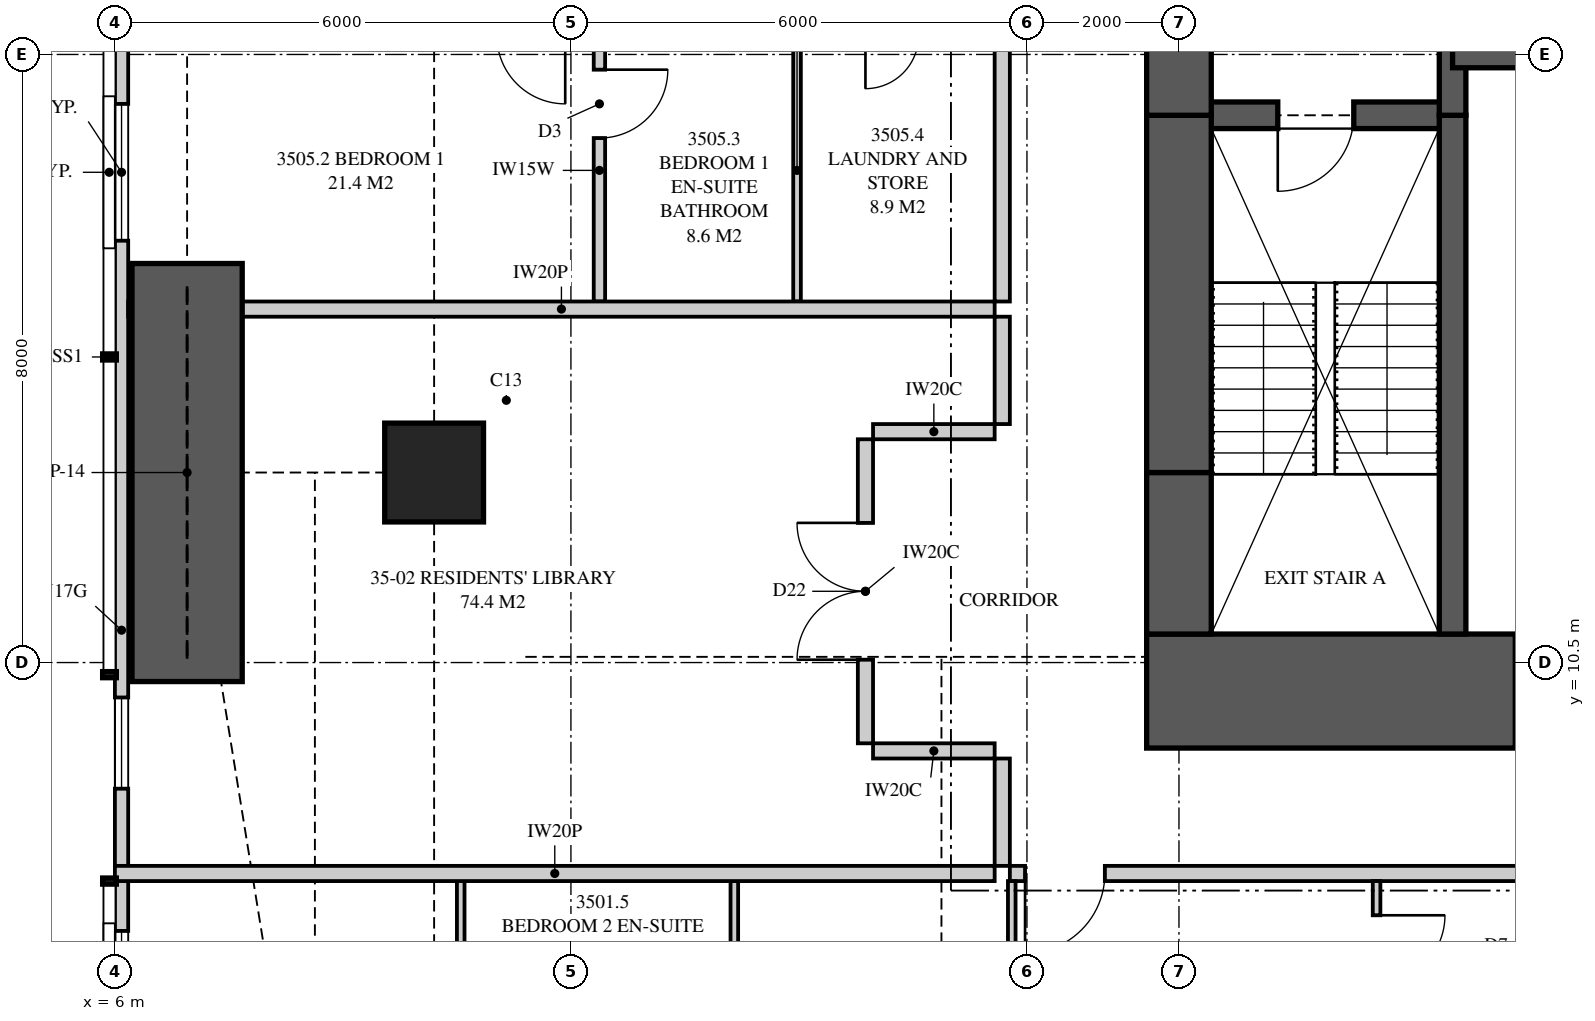
"""IFC4 building model, lengths in metres.
Left out: names, types, materials, properties, quantities, classifications, styles, units other than length and angle.
Written with IfcOpenShell. Run it as: python <this file> out.ifc"""

import sys

from ifc_helpers import new_model, si_unit, direction, frame, frame_2d, origin, origin_2d, place, context, subcontext, project, spatial, polyline, rectangle, outline, extrude, element, fill, save


model = new_model("IFC4")
c1 = context("Model", 3, precision=1e-05, world=origin(), true_north=direction((0.0, 1.0)))
c2 = subcontext(c1, "Body", "Model", "MODEL_VIEW")
j1 = project(units=[si_unit("LENGTHUNIT", "METRE"), si_unit("PLANEANGLEUNIT", "RADIAN")], contexts=[c1])
p1 = place(None, origin())
s1 = spatial("IfcSite", under=j1, at=p1, CompositionType="ELEMENT")
p2 = place(p1, origin())
s2 = spatial("IfcBuilding", under=s1, at=p2, CompositionType="ELEMENT")
p3 = place(p2, frame((0.0, 0.0, 128.3)))
s3 = spatial("IfcBuildingStorey", under=s2, at=p3, CompositionType="ELEMENT", Elevation=128.3)
p4 = place(p3, frame((10.2, 13.0, 0.0), z_axis=(0.0, 0.0, 1.0), x_axis=(1.0, 0.0, 0.0)))
e1 = element("IfcColumn", 1, at=p4, inside=s3, PredefinedType="COLUMN", context=c2, shape_type="SweptSolid", body=[
    extrude(rectangle(XDim=1.3, YDim=1.3, at=origin_2d()), origin(), (0.0, 0.0, 1.0), 3.35),
])
p5 = place(p3, frame((19.575, 10.125, 0.0), z_axis=(0.0, 0.0, 1.0), x_axis=(1.0, 0.0, 0.0)))
e2 = element("IfcWall", 2, at=p5, inside=s3, PredefinedType="SHEAR", context=c2, shape_type="SweptSolid", body=[
    extrude(rectangle(XDim=6.425, YDim=1.5, at=frame_2d((3.212, 0.0))), origin(), (0.0, 0.0, 1.0), 3.35),
])
p6 = place(p5, frame((4.85, 0.0, 0.0)))
e3 = element("IfcOpeningElement", 3, at=p6, cuts=e2, PredefinedType="OPENING", context=c2, shape_type="SweptSolid", body=[
    extrude(rectangle(XDim=0.75, YDim=2.1, at=frame_2d((0.375, 1.05))), frame((0.0, 0.76, 0.0), z_axis=(0.0, -1.0, 0.0), x_axis=(1.0, 0.0, 0.0)), (0.0, 0.0, 1.0), 1.52),
])
p7 = place(p3, frame((20.0, 23.3, 0.0), z_axis=(0.0, 0.0, 1.0), x_axis=(0.0, -1.0, 0.0)))
e4 = element("IfcWall", 4, at=p7, inside=s3, PredefinedType="SHEAR", context=c2, shape_type="SweptSolid", body=[
    extrude(rectangle(XDim=5.6, YDim=0.85, at=frame_2d((2.8, 0.0))), origin(), (0.0, 0.0, 1.0), 3.35),
])
p8 = place(p7, frame((3.4, 0.0, 0.0)))
e5 = element("IfcOpeningElement", 5, at=p8, cuts=e4, PredefinedType="OPENING", context=c2, shape_type="SweptSolid", body=[
    extrude(rectangle(XDim=1.2, YDim=2.2, at=frame_2d((0.6, 1.1))), frame((0.0, 0.435, 0.0), z_axis=(0.0, -1.0, 0.0), x_axis=(1.0, 0.0, 0.0)), (0.0, 0.0, 1.0), 0.87),
])
p9 = place(p3, frame((20.0, 17.7, 0.0), z_axis=(0.0, 0.0, 1.0), x_axis=(0.0, -1.0, 0.0)))
e6 = element("IfcWall", 6, at=p9, inside=s3, PredefinedType="SHEAR", context=c2, shape_type="SweptSolid", body=[
    extrude(rectangle(XDim=4.7, YDim=0.85, at=frame_2d((2.35, 0.0))), origin(), (0.0, 0.0, 1.0), 3.35),
])
p10 = place(p3, frame((20.0, 13.0, 0.0), z_axis=(0.0, 0.0, 1.0), x_axis=(0.0, -1.0, 0.0)))
e7 = element("IfcWall", 7, at=p10, inside=s3, PredefinedType="SHEAR", context=c2, shape_type="SweptSolid", body=[
    extrude(rectangle(XDim=2.125, YDim=0.85, at=frame_2d((1.062, 0.0))), origin(), (0.0, 0.0, 1.0), 3.35),
])
p11 = place(p3, frame((23.6, 10.875, 0.0), z_axis=(0.0, 0.0, 1.0), x_axis=(0.0, 1.0, 0.0)))
e8 = element("IfcWall", 8, at=p11, inside=s3, PredefinedType="SHEAR", context=c2, shape_type="SweptSolid", body=[
    extrude(rectangle(XDim=6.825, YDim=0.35, at=frame_2d((3.413, 0.0))), origin(), (0.0, 0.0, 1.0), 3.35),
])
p12 = place(p3, frame((23.6, 17.7, 0.0), z_axis=(0.0, 0.0, 1.0), x_axis=(0.0, 1.0, 0.0)))
e9 = element("IfcWall", 9, at=p12, inside=s3, PredefinedType="SHEAR", context=c2, shape_type="SweptSolid", body=[
    extrude(rectangle(XDim=5.6, YDim=0.35, at=frame_2d((2.8, 0.0))), origin(), (0.0, 0.0, 1.0), 3.35),
])
p13 = place(p3, frame((20.0, 17.7, 0.0), z_axis=(0.0, 0.0, 1.0), x_axis=(1.0, 0.0, 0.0)))
e10 = element("IfcWall", 10, at=p13, inside=s3, PredefinedType="SHEAR", context=c2, shape_type="SweptSolid", body=[
    extrude(rectangle(XDim=3.6, YDim=0.35, at=frame_2d((1.8, 0.0))), origin(), (0.0, 0.0, 1.0), 3.35),
])
p14 = place(p13, frame((1.3, 0.0, 0.0)))
e11 = element("IfcOpeningElement", 11, at=p14, cuts=e10, PredefinedType="OPENING", context=c2, shape_type="SweptSolid", body=[
    extrude(rectangle(XDim=1.0, YDim=2.1, at=frame_2d((0.5, 1.05))), frame((0.0, 0.185, 0.0), z_axis=(0.0, -1.0, 0.0), x_axis=(1.0, 0.0, 0.0)), (0.0, 0.0, 1.0), 0.37),
])
p15 = place(p3, frame((23.6, 18.5, 0.0), z_axis=(0.0, 0.0, 1.0), x_axis=(1.0, 0.0, 0.0)))
e12 = element("IfcWall", 12, at=p15, inside=s3, PredefinedType="SHEAR", context=c2, shape_type="SweptSolid", body=[
    extrude(rectangle(XDim=2.4, YDim=0.35, at=frame_2d((1.2, 0.0))), origin(), (0.0, 0.0, 1.0), 3.35),
])
p16 = place(p3, frame((6.087, 18.8, 0.0), z_axis=(0.0, 0.0, 1.0), x_axis=(0.0, -1.0, 0.0)))
e13 = element("IfcWall", 13, at=p16, inside=s3, PredefinedType="SOLIDWALL", context=c2, shape_type="SweptSolid", body=[
    extrude(outline(polyline([(0.0, 0.0), (15.749, 0.0), (15.749, 3.11), (6.019, 3.11), (6.019, 2.15), (5.926, 2.15), (5.926, 3.11), (5.8, 3.11), (5.8, 2.15), (0.0, 2.15), (0.0, 0.0)])), frame((0.0, 0.087, 0.0), z_axis=(0.0, -1.0, 0.0), x_axis=(1.0, 0.0, 0.0)), (0.0, 0.0, 1.0), 0.175),
])
p17 = place(p16, frame((0.95, 0.0, 0.4)))
e14 = element("IfcOpeningElement", 14, at=p17, cuts=e13, PredefinedType="OPENING", context=c2, shape_type="SweptSolid", body=[
    extrude(rectangle(XDim=1.8, YDim=1.7, at=frame_2d((0.9, 0.85))), frame((0.0, 0.097, 0.0), z_axis=(0.0, -1.0, 0.0), x_axis=(1.0, 0.0, 0.0)), (0.0, 0.0, 1.0), 0.195),
])
p18 = place(p16, frame((8.76, 0.0, 0.4)))
e15 = element("IfcOpeningElement", 15, at=p18, cuts=e13, PredefinedType="OPENING", context=c2, shape_type="SweptSolid", body=[
    extrude(rectangle(XDim=1.2, YDim=1.7, at=frame_2d((0.6, 0.85))), frame((0.0, 0.097, 0.0), z_axis=(0.0, -1.0, 0.0), x_axis=(1.0, 0.0, 0.0)), (0.0, 0.0, 1.0), 0.195),
])
p19 = place(p16, frame((11.831, 0.0, 0.4)))
e16 = element("IfcOpeningElement", 16, at=p19, cuts=e13, PredefinedType="OPENING", context=c2, shape_type="SweptSolid", body=[
    extrude(rectangle(XDim=1.8, YDim=1.7, at=frame_2d((0.9, 0.85))), frame((0.0, 0.097, 0.0), z_axis=(0.0, -1.0, 0.0), x_axis=(1.0, 0.0, 0.0)), (0.0, 0.0, 1.0), 0.195),
])
p20 = place(p3, frame((17.775, 7.725, 0.0), z_axis=(0.0, 0.0, 1.0), x_axis=(1.0, 0.0, 0.0)))
e17 = element("IfcWall", 17, at=p20, inside=s3, PredefinedType="PARTITIONING", context=c2, shape_type="SweptSolid", body=[
    extrude(rectangle(XDim=9.025, YDim=0.2, at=frame_2d((4.513, 0.0))), origin(), (0.0, 0.0, 1.0), 3.11),
])
p21 = place(p20, frame((0.2, 0.0, 0.0)))
e18 = element("IfcOpeningElement", 18, at=p21, cuts=e17, PredefinedType="OPENING", context=c2, shape_type="SweptSolid", body=[
    extrude(rectangle(XDim=1.05, YDim=2.2, at=frame_2d((0.525, 1.1))), frame((0.0, 0.11, 0.0), z_axis=(0.0, -1.0, 0.0), x_axis=(1.0, 0.0, 0.0)), (0.0, 0.0, 1.0), 0.22),
])
p22 = place(p3, frame((10.55, 2.76, 0.0), z_axis=(0.0, 0.0, 1.0), x_axis=(0.0, 1.0, 0.0)))
e19 = element("IfcWall", 19, at=p22, inside=s3, PredefinedType="PARTITIONING", context=c2, shape_type="SweptSolid", body=[
    extrude(outline(polyline([(0.0, 0.0), (4.865, 0.0), (4.865, 2.51), (0.358, 2.51), (0.358, 2.15), (0.0, 2.15), (0.0, 0.0)])), frame((0.0, 0.05, 0.0), z_axis=(0.0, -1.0, 0.0), x_axis=(1.0, 0.0, 0.0)), (0.0, 0.0, 1.0), 0.1),
])
p23 = place(p22, frame((2.834, 0.0, 0.0)))
e20 = element("IfcOpeningElement", 20, at=p23, cuts=e19, PredefinedType="OPENING", context=c2, shape_type="SweptSolid", body=[
    extrude(rectangle(XDim=0.9, YDim=2.1, at=frame_2d((0.45, 1.05))), frame((0.0, 0.06, 0.0), z_axis=(0.0, -1.0, 0.0), x_axis=(1.0, 0.0, 0.0)), (0.0, 0.0, 1.0), 0.12),
])
p24 = place(p3, frame((14.15, 0.175, 0.0), z_axis=(0.0, 0.0, 1.0), x_axis=(0.0, 1.0, 0.0)))
e21 = element("IfcWall", 21, at=p24, inside=s3, PredefinedType="PARTITIONING", context=c2, shape_type="SweptSolid", body=[
    extrude(outline(polyline([(0.0, 0.0), (7.45, 0.0), (7.45, 3.11), (2.208, 3.11), (2.208, 2.15), (0.453, 2.15), (0.453, 3.11), (0.0, 3.11), (0.0, 0.0)])), frame((0.0, 0.05, 0.0), z_axis=(0.0, -1.0, 0.0), x_axis=(1.0, 0.0, 0.0)), (0.0, 0.0, 1.0), 0.1),
])
p25 = place(p24, frame((3.6, 0.0, 0.0)))
e22 = element("IfcOpeningElement", 22, at=p25, cuts=e21, PredefinedType="OPENING", context=c2, shape_type="SweptSolid", body=[
    extrude(rectangle(XDim=0.9, YDim=2.1, at=frame_2d((0.45, 1.05))), frame((0.0, 0.06, 0.0), z_axis=(0.0, -1.0, 0.0), x_axis=(1.0, 0.0, 0.0)), (0.0, 0.0, 1.0), 0.12),
])
p26 = place(p3, frame((22.6, 0.175, 0.0), z_axis=(0.0, 0.0, 1.0), x_axis=(0.0, 1.0, 0.0)))
e23 = element("IfcWall", 23, at=p26, inside=s3, PredefinedType="PARTITIONING", context=c2, shape_type="SweptSolid", body=[
    extrude(outline(polyline([(0.0, 0.0), (7.45, 0.0), (7.45, 3.11), (1.635, 3.11), (1.635, 2.15), (0.0, 2.15), (0.0, 3.11), (0.0, 0.0)])), frame((0.0, 0.05, 0.0), z_axis=(0.0, -1.0, 0.0), x_axis=(1.0, 0.0, 0.0)), (0.0, 0.0, 1.0), 0.1),
])
p27 = place(p26, frame((6.1, 0.0, 0.0)))
e24 = element("IfcOpeningElement", 24, at=p27, cuts=e23, PredefinedType="OPENING", context=c2, shape_type="SweptSolid", body=[
    extrude(rectangle(XDim=0.9, YDim=2.1, at=frame_2d((0.45, 1.05))), frame((0.0, 0.06, 0.0), z_axis=(0.0, -1.0, 0.0), x_axis=(1.0, 0.0, 0.0)), (0.0, 0.0, 1.0), 0.12),
])
p28 = place(p3, frame((17.8, 4.675, 0.0), z_axis=(0.0, 0.0, 1.0), x_axis=(0.0, 1.0, 0.0)))
e25 = element("IfcWall", 25, at=p28, inside=s3, PredefinedType="PARTITIONING", context=c2, shape_type="SweptSolid", body=[
    extrude(rectangle(XDim=2.95, YDim=0.1, at=frame_2d((1.475, 0.0))), origin(), (0.0, 0.0, 1.0), 3.11),
])
p29 = place(p3, frame((6.0, 7.725, 0.0), z_axis=(0.0, 0.0, 1.0), x_axis=(1.0, 0.0, 0.0)))
e26 = element("IfcWall", 26, at=p29, inside=s3, PredefinedType="PARTITIONING", context=c2, shape_type="SweptSolid", body=[
    extrude(outline(polyline([(0.0, 0.0), (11.575, 0.0), (11.575, 3.11), (11.212, 3.11), (11.212, 2.541), (10.538, 2.541), (10.538, 3.11), (5.51, 3.11), (5.51, 2.51), (2.969, 2.51), (2.969, 2.541), (2.727, 2.541), (2.727, 2.15), (0.884, 2.15), (0.884, 3.11), (0.0, 3.11), (0.0, 0.0)])), frame((0.0, 0.1, 0.0), z_axis=(0.0, -1.0, 0.0), x_axis=(1.0, 0.0, 0.0)), (0.0, 0.0, 1.0), 0.2),
])
p30 = place(p3, frame((6.175, 15.15, 0.0), z_axis=(0.0, 0.0, 1.0), x_axis=(1.0, 0.0, 0.0)))
e27 = element("IfcWall", 27, at=p30, inside=s3, PredefinedType="PARTITIONING", context=c2, shape_type="SweptSolid", body=[
    extrude(outline(polyline([(0.529, 2.15), (0.0, 2.15), (0.0, 0.0), (0.529, 0.0), (0.529, 0.034), (1.021, 0.034), (1.021, 0.0), (11.4, 0.0), (11.4, 3.11), (5.335, 3.11), (5.335, 2.51), (2.715, 2.51), (2.715, 3.11), (1.685, 3.11), (1.685, 2.15), (1.021, 2.15), (1.021, 2.116), (0.529, 2.116), (0.529, 2.15)])), frame((0.0, 0.1, 0.0), z_axis=(0.0, -1.0, 0.0), x_axis=(1.0, 0.0, 0.0)), (0.0, 0.0, 1.0), 0.2),
])
p31 = place(p3, frame((17.675, 7.825, 0.0), z_axis=(0.0, 0.0, 1.0), x_axis=(0.0, 1.0, 0.0)))
e28 = element("IfcWall", 28, at=p31, inside=s3, PredefinedType="PARTITIONING", context=c2, shape_type="SweptSolid", body=[
    extrude(rectangle(XDim=1.413, YDim=0.2, at=frame_2d((0.706, 0.0))), origin(), (0.0, 0.0, 1.0), 3.11),
])
p32 = place(p3, frame((17.675, 15.25, 0.0), z_axis=(0.0, 0.0, 1.0), x_axis=(0.0, 1.0, 0.0)))
e29 = element("IfcWall", 29, at=p32, inside=s3, PredefinedType="PARTITIONING", context=c2, shape_type="SweptSolid", body=[
    extrude(rectangle(XDim=5.562, YDim=0.2, at=frame_2d((2.781, 0.0))), origin(), (0.0, 0.0, 1.0), 3.11),
])
p33 = place(p3, frame((12.375, 15.25, 0.0), z_axis=(0.0, 0.0, 1.0), x_axis=(0.0, 1.0, 0.0)))
e30 = element("IfcWall", 30, at=p33, inside=s3, PredefinedType="PLUMBINGWALL", context=c2, shape_type="SweptSolid", body=[
    extrude(rectangle(XDim=3.45, YDim=0.15, at=frame_2d((1.725, 0.0))), origin(), (0.0, 0.0, 1.0), 3.11),
])
p34 = place(p33, frame((2.15, 0.0, 0.0)))
e31 = element("IfcOpeningElement", 31, at=p34, cuts=e30, PredefinedType="OPENING", context=c2, shape_type="SweptSolid", body=[
    extrude(rectangle(XDim=0.9, YDim=2.1, at=frame_2d((0.45, 1.05))), frame((0.0, 0.085, 0.0), z_axis=(0.0, -1.0, 0.0), x_axis=(1.0, 0.0, 0.0)), (0.0, 0.0, 1.0), 0.17),
])
p35 = place(p3, frame((14.975, 15.25, 0.0), z_axis=(0.0, 0.0, 1.0), x_axis=(0.0, 1.0, 0.0)))
e32 = element("IfcWall", 32, at=p35, inside=s3, PredefinedType="PARTITIONING", context=c2, shape_type="SweptSolid", body=[
    extrude(rectangle(XDim=3.45, YDim=0.1, at=frame_2d((1.725, 0.0))), origin(), (0.0, 0.0, 1.0), 3.11),
])
p36 = place(p3, frame((17.675, 13.637, 0.0), z_axis=(0.0, 0.0, 1.0), x_axis=(0.0, 1.0, 0.0)))
e33 = element("IfcWall", 33, at=p36, inside=s3, PredefinedType="PARTITIONING", context=c2, shape_type="SweptSolid", body=[
    extrude(rectangle(XDim=1.413, YDim=0.2, at=frame_2d((0.706, 0.0))), origin(), (0.0, 0.0, 1.0), 3.11),
])
p37 = place(p3, frame((15.875, 9.438, 0.0), z_axis=(0.0, 0.0, 1.0), x_axis=(0.0, 1.0, 0.0)))
e34 = element("IfcWall", 34, at=p37, inside=s3, PredefinedType="PARTITIONING", context=c2, shape_type="SweptSolid", body=[
    extrude(outline(polyline([(0.0, 0.0), (4.0, 0.0), (4.0, 3.11), (1.475, 3.11), (1.475, 2.541), (0.8, 2.541), (0.8, 3.11), (0.0, 3.11), (0.0, 0.0)])), frame((0.0, 0.1, 0.0), z_axis=(0.0, -1.0, 0.0), x_axis=(1.0, 0.0, 0.0)), (0.0, 0.0, 1.0), 0.2),
])
p38 = place(p37, frame((1.1, 0.0, 0.0)))
e35 = element("IfcOpeningElement", 35, at=p38, cuts=e34, PredefinedType="OPENING", context=c2, shape_type="SweptSolid", body=[
    extrude(rectangle(XDim=1.8, YDim=2.1, at=frame_2d((0.9, 1.05))), frame((0.0, 0.11, 0.0), z_axis=(0.0, -1.0, 0.0), x_axis=(1.0, 0.0, 0.0)), (0.0, 0.0, 1.0), 0.22),
])
p39 = place(p3, frame((17.575, 9.337, 0.0), z_axis=(0.0, 0.0, 1.0), x_axis=(-1.0, 0.0, 0.0)))
e36 = element("IfcWall", 36, at=p39, inside=s3, PredefinedType="PARTITIONING", context=c2, shape_type="SweptSolid", body=[
    extrude(outline(polyline([(0.0, 0.0), (1.6, 0.0), (1.6, 3.11), (1.037, 3.11), (1.037, 2.541), (0.363, 2.541), (0.363, 3.11), (0.0, 3.11), (0.0, 0.0)])), frame((0.0, 0.1, 0.0), z_axis=(0.0, -1.0, 0.0), x_axis=(1.0, 0.0, 0.0)), (0.0, 0.0, 1.0), 0.2),
])
p40 = place(p3, frame((17.575, 13.538, 0.0), z_axis=(0.0, 0.0, 1.0), x_axis=(-1.0, 0.0, 0.0)))
e37 = element("IfcWall", 37, at=p40, inside=s3, PredefinedType="PARTITIONING", context=c2, shape_type="SweptSolid", body=[
    extrude(rectangle(XDim=1.6, YDim=0.2, at=frame_2d((0.8, 0.0))), origin(), (0.0, 0.0, 1.0), 3.11),
])
p41 = place(p3, frame((6.95, 10.25, 0.0), z_axis=(0.0, 0.0, 1.0), x_axis=(0.0, 1.0, 0.0)))
e38 = element("IfcWall", 38, at=p41, inside=s3, PredefinedType="SHEAR", context=c2, shape_type="SweptSolid", body=[
    extrude(rectangle(XDim=5.5, YDim=1.45, at=frame_2d((2.75, 0.0))), origin(), (0.0, 0.0, 1.0), 3.35),
])
p42 = place(p17, origin())
e39 = element("IfcWindow", 39, at=p42, inside=s3, PartitioningType="SINGLE_PANEL", PredefinedType="WINDOW", context=c2, shape_type="SweptSolid", body=[
    extrude(rectangle(XDim=1.8, YDim=1.7, at=frame_2d((0.9, 0.85))), frame((0.0, 0.03, 0.0), z_axis=(0.0, -1.0, 0.0), x_axis=(1.0, 0.0, 0.0)), (0.0, 0.0, 1.0), 0.06),
])
fill(e14, e39)
p43 = place(p18, origin())
e40 = element("IfcWindow", 40, at=p43, inside=s3, PartitioningType="SINGLE_PANEL", PredefinedType="WINDOW", context=c2, shape_type="SweptSolid", body=[
    extrude(rectangle(XDim=1.2, YDim=1.7, at=frame_2d((0.6, 0.85))), frame((0.0, 0.03, 0.0), z_axis=(0.0, -1.0, 0.0), x_axis=(1.0, 0.0, 0.0)), (0.0, 0.0, 1.0), 0.06),
])
fill(e15, e40)
p44 = place(p19, origin())
e41 = element("IfcWindow", 41, at=p44, inside=s3, PartitioningType="SINGLE_PANEL", PredefinedType="WINDOW", context=c2, shape_type="SweptSolid", body=[
    extrude(rectangle(XDim=1.8, YDim=1.7, at=frame_2d((0.9, 0.85))), frame((0.0, 0.03, 0.0), z_axis=(0.0, -1.0, 0.0), x_axis=(1.0, 0.0, 0.0)), (0.0, 0.0, 1.0), 0.06),
])
fill(e16, e41)
p45 = place(p21, frame((1.05, 0.0, 0.0), z_axis=(0.0, 0.0, 1.0), x_axis=(-1.0, 0.0, 0.0)))
e42 = element("IfcDoor", 42, at=p45, inside=s3, OperationType="SINGLE_SWING_RIGHT", PredefinedType="DOOR", context=c2, shape_type="SweptSolid", body=[
    extrude(rectangle(XDim=1.05, YDim=2.2, at=frame_2d((0.525, 1.1))), frame((0.0, 0.025, 0.0), z_axis=(0.0, -1.0, 0.0), x_axis=(1.0, 0.0, 0.0)), (0.0, 0.0, 1.0), 0.05),
])
fill(e18, e42)
p46 = place(p27, frame((0.9, 0.0, 0.0), z_axis=(0.0, 0.0, 1.0), x_axis=(-1.0, 0.0, 0.0)))
e43 = element("IfcDoor", 43, at=p46, inside=s3, OperationType="SINGLE_SWING_LEFT", PredefinedType="DOOR", context=c2, shape_type="SweptSolid", body=[
    extrude(rectangle(XDim=0.9, YDim=2.1, at=frame_2d((0.45, 1.05))), frame((0.0, 0.025, 0.0), z_axis=(0.0, -1.0, 0.0), x_axis=(1.0, 0.0, 0.0)), (0.0, 0.0, 1.0), 0.05),
])
fill(e24, e43)
p47 = place(p38, origin())
e44 = element("IfcDoor", 44, at=p47, inside=s3, OperationType="DOUBLE_DOOR_SINGLE_SWING", PredefinedType="DOOR", context=c2, shape_type="SweptSolid", body=[
    extrude(rectangle(XDim=1.8, YDim=2.1, at=frame_2d((0.9, 1.05))), frame((0.0, 0.025, 0.0), z_axis=(0.0, -1.0, 0.0), x_axis=(1.0, 0.0, 0.0)), (0.0, 0.0, 1.0), 0.05),
])
fill(e35, e44)
p48 = place(p34, frame((0.9, 0.0, 0.0), z_axis=(0.0, 0.0, 1.0), x_axis=(-1.0, 0.0, 0.0)))
e45 = element("IfcDoor", 45, at=p48, inside=s3, OperationType="SINGLE_SWING_LEFT", PredefinedType="DOOR", context=c2, shape_type="SweptSolid", body=[
    extrude(rectangle(XDim=0.9, YDim=2.1, at=frame_2d((0.45, 1.05))), frame((0.0, 0.025, 0.0), z_axis=(0.0, -1.0, 0.0), x_axis=(1.0, 0.0, 0.0)), (0.0, 0.0, 1.0), 0.05),
])
fill(e31, e45)
p49 = place(p14, frame((1.0, 0.0, 0.0), z_axis=(0.0, 0.0, 1.0), x_axis=(-1.0, 0.0, 0.0)))
e46 = element("IfcDoor", 46, at=p49, inside=s3, OperationType="SINGLE_SWING_RIGHT", PredefinedType="DOOR", context=c2, shape_type="SweptSolid", body=[
    extrude(rectangle(XDim=1.0, YDim=2.1, at=frame_2d((0.5, 1.05))), frame((0.0, 0.025, 0.0), z_axis=(0.0, -1.0, 0.0), x_axis=(1.0, 0.0, 0.0)), (0.0, 0.0, 1.0), 0.05),
])
fill(e11, e46)
save(model, sys.argv[1])
